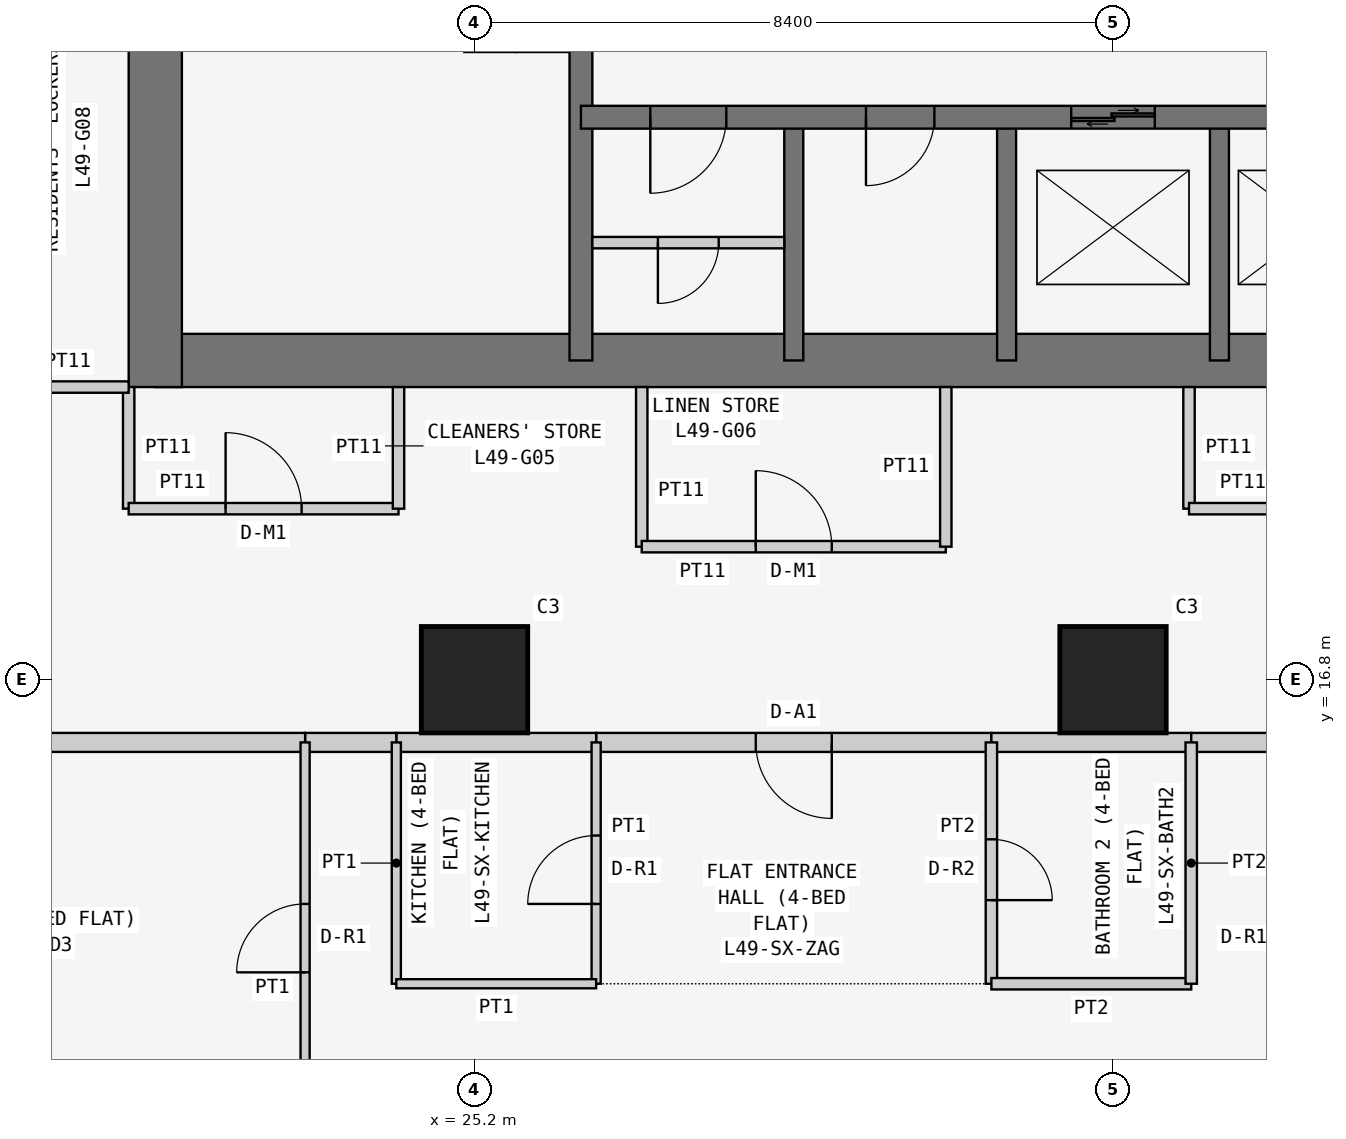
"""IFC4 building model, lengths in metres.
Left out: names, types, materials, properties, quantities, classifications, styles, units other than length and angle.
Written with IfcOpenShell. Run it as: python <this file> out.ifc"""

import sys

from ifc_helpers import new_model, si_unit, direction, frame, frame_2d, origin, origin_2d, place, context, subcontext, project, spatial, rectangle, extrude, element, fill, save


model = new_model("IFC4")
c1 = context("Model", 3, precision=1e-05, world=origin(), true_north=direction((0.0, 1.0)))
c2 = subcontext(c1, "Body", "Model", "MODEL_VIEW")
j1 = project(units=[si_unit("LENGTHUNIT", "METRE"), si_unit("PLANEANGLEUNIT", "RADIAN")], contexts=[c1])
p1 = place(None, origin())
s1 = spatial("IfcSite", under=j1, at=p1, CompositionType="ELEMENT")
p2 = place(p1, origin())
s2 = spatial("IfcBuilding", under=s1, at=p2, CompositionType="ELEMENT")
p3 = place(p2, frame((0.0, 0.0, 190.5)))
s3 = spatial("IfcBuildingStorey", under=s2, at=p3, CompositionType="ELEMENT", Elevation=190.5)
for number, where, z_axis, x_axis in (
    (1, (25.2, 16.8, 0.0), (0.0, 0.0, 1.0), (1.0, 0.0, 0.0)),
    (2, (33.6, 16.8, 0.0), (0.0, 0.0, 1.0), (1.0, 0.0, 0.0)),
):
    element("IfcColumn", number, at=place(p3, frame(where, z_axis=z_axis, x_axis=x_axis)), inside=s3, PredefinedType="COLUMN", context=c2, shape_type="SweptSolid", body=[
        extrude(rectangle(XDim=1.4, YDim=1.4, at=origin_2d()), origin(), (0.0, 0.0, 1.0), 3.6),
    ])
p4 = place(p3, frame((21.0, 21.0, 0.0), z_axis=(0.0, 0.0, 1.0), x_axis=(1.0, 0.0, 0.0)))
e3 = element("IfcWall", 3, at=p4, inside=s3, PredefinedType="SHEAR", context=c2, shape_type="SweptSolid", body=[
    extrude(rectangle(XDim=17.15, YDim=0.7, at=frame_2d((8.575, 0.0))), origin(), (0.0, 0.0, 1.0), 3.6),
])
p5 = place(p3, frame((21.0, 37.8, 0.0), z_axis=(0.0, 0.0, 1.0), x_axis=(0.0, -1.0, 0.0)))
e4 = element("IfcWall", 4, at=p5, inside=s3, PredefinedType="SHEAR", context=c2, shape_type="SweptSolid", body=[
    extrude(rectangle(XDim=17.15, YDim=0.7, at=frame_2d((8.575, 0.0))), origin(), (0.0, 0.0, 1.0), 3.6),
])
p6 = place(p5, frame((5.4, 0.0, 0.0)))
e5 = element("IfcOpeningElement", 5, at=p6, cuts=e4, PredefinedType="OPENING", context=c2, shape_type="SweptSolid", body=[
    extrude(rectangle(XDim=1.2, YDim=2.1, at=frame_2d((0.6, 1.05))), frame((0.0, 0.36, 0.0), z_axis=(0.0, -1.0, 0.0), x_axis=(1.0, 0.0, 0.0)), (0.0, 0.0, 1.0), 0.72),
])
p7 = place(p3, frame((26.6, 21.0, 0.0), z_axis=(0.0, 0.0, 1.0), x_axis=(0.0, 1.0, 0.0)))
e6 = element("IfcWall", 6, at=p7, inside=s3, PredefinedType="SHEAR", context=c2, shape_type="SweptSolid", body=[
    extrude(rectangle(XDim=16.8, YDim=0.3, at=frame_2d((8.4, 0.0))), origin(), (0.0, 0.0, 1.0), 3.6),
])
p8 = place(p7, frame((10.4, 0.0, 0.0)))
e7 = element("IfcOpeningElement", 7, at=p8, cuts=e6, PredefinedType="OPENING", context=c2, shape_type="SweptSolid", body=[
    extrude(rectangle(XDim=1.2, YDim=2.1, at=frame_2d((0.6, 1.05))), frame((0.0, 0.16, 0.0), z_axis=(0.0, -1.0, 0.0), x_axis=(1.0, 0.0, 0.0)), (0.0, 0.0, 1.0), 0.32),
])
p9 = place(p3, frame((26.6, 24.2, 0.0), z_axis=(0.0, 0.0, 1.0), x_axis=(1.0, 0.0, 0.0)))
e8 = element("IfcWall", 8, at=p9, inside=s3, PredefinedType="SHEAR", context=c2, shape_type="SweptSolid", body=[
    extrude(rectangle(XDim=11.2, YDim=0.3, at=frame_2d((5.6, 0.0))), origin(), (0.0, 0.0, 1.0), 3.6),
])
p10 = place(p9, frame((0.913, 0.0, 0.0)))
e9 = element("IfcOpeningElement", 9, at=p10, cuts=e8, PredefinedType="OPENING", context=c2, shape_type="SweptSolid", body=[
    extrude(rectangle(XDim=1.0, YDim=2.1, at=frame_2d((0.5, 1.05))), frame((0.0, 0.16, 0.0), z_axis=(0.0, -1.0, 0.0), x_axis=(1.0, 0.0, 0.0)), (0.0, 0.0, 1.0), 0.32),
])
p11 = place(p9, frame((3.75, 0.0, 0.0)))
e10 = element("IfcOpeningElement", 10, at=p11, cuts=e8, PredefinedType="OPENING", context=c2, shape_type="SweptSolid", body=[
    extrude(rectangle(XDim=0.9, YDim=2.1, at=frame_2d((0.45, 1.05))), frame((0.0, 0.16, 0.0), z_axis=(0.0, -1.0, 0.0), x_axis=(1.0, 0.0, 0.0)), (0.0, 0.0, 1.0), 0.32),
])
p12 = place(p9, frame((6.45, 0.0, 0.0)))
e11 = element("IfcOpeningElement", 11, at=p12, cuts=e8, PredefinedType="OPENING", context=c2, shape_type="SweptSolid", body=[
    extrude(rectangle(XDim=1.1, YDim=2.1, at=frame_2d((0.55, 1.05))), frame((0.0, 0.16, 0.0), z_axis=(0.0, -1.0, 0.0), x_axis=(1.0, 0.0, 0.0)), (0.0, 0.0, 1.0), 0.32),
])
p13 = place(p9, frame((9.1, 0.0, 0.0)))
e12 = element("IfcOpeningElement", 12, at=p13, cuts=e8, PredefinedType="OPENING", context=c2, shape_type="SweptSolid", body=[
    extrude(rectangle(XDim=1.1, YDim=2.1, at=frame_2d((0.55, 1.05))), frame((0.0, 0.16, 0.0), z_axis=(0.0, -1.0, 0.0), x_axis=(1.0, 0.0, 0.0)), (0.0, 0.0, 1.0), 0.32),
])
for number, where, z_axis, x_axis in (
    (13, (29.4, 21.0, 0.0), (0.0, 0.0, 1.0), (0.0, 1.0, 0.0)),
    (14, (32.2, 21.0, 0.0), (0.0, 0.0, 1.0), (0.0, 1.0, 0.0)),
    (15, (35.0, 21.0, 0.0), (0.0, 0.0, 1.0), (0.0, 1.0, 0.0)),
):
    element("IfcWall", number, at=place(p3, frame(where, z_axis=z_axis, x_axis=x_axis)), inside=s3, PredefinedType="SHEAR", context=c2, shape_type="SweptSolid", body=[
        extrude(rectangle(XDim=3.2, YDim=0.25, at=frame_2d((1.6, 0.0))), origin(), (0.0, 0.0, 1.0), 3.6),
    ])
p14 = place(p3, frame((20.65, 20.65, 0.0), z_axis=(0.0, 0.0, 1.0), x_axis=(0.0, -1.0, 0.0)))
e16 = element("IfcWall", 16, at=p14, inside=s3, PredefinedType="PARTITIONING", context=c2, shape_type="SweptSolid", body=[
    extrude(rectangle(XDim=1.6, YDim=0.15, at=frame_2d((0.8, 0.0))), origin(), (0.0, 0.0, 1.0), 3.45),
])
p15 = place(p3, frame((20.65, 19.05, 0.0), z_axis=(0.0, 0.0, 1.0), x_axis=(1.0, 0.0, 0.0)))
e17 = element("IfcWall", 17, at=p15, inside=s3, PredefinedType="PARTITIONING", context=c2, shape_type="SweptSolid", body=[
    extrude(rectangle(XDim=3.55, YDim=0.15, at=frame_2d((1.775, 0.0))), origin(), (0.0, 0.0, 1.0), 3.45),
])
p16 = place(p15, frame((1.275, 0.0, 0.0)))
e18 = element("IfcOpeningElement", 18, at=p16, cuts=e17, PredefinedType="OPENING", context=c2, shape_type="SweptSolid", body=[
    extrude(rectangle(XDim=1.0, YDim=2.1, at=frame_2d((0.5, 1.05))), frame((0.0, 0.085, 0.0), z_axis=(0.0, -1.0, 0.0), x_axis=(1.0, 0.0, 0.0)), (0.0, 0.0, 1.0), 0.17),
])
p17 = place(p3, frame((24.2, 19.05, 0.0), z_axis=(0.0, 0.0, 1.0), x_axis=(0.0, 1.0, 0.0)))
e19 = element("IfcWall", 19, at=p17, inside=s3, PredefinedType="PARTITIONING", context=c2, shape_type="SweptSolid", body=[
    extrude(rectangle(XDim=1.6, YDim=0.15, at=frame_2d((0.8, 0.0))), origin(), (0.0, 0.0, 1.0), 3.45),
])
p18 = place(p3, frame((27.4, 20.65, 0.0), z_axis=(0.0, 0.0, 1.0), x_axis=(0.0, -1.0, 0.0)))
e20 = element("IfcWall", 20, at=p18, inside=s3, PredefinedType="PARTITIONING", context=c2, shape_type="SweptSolid", body=[
    extrude(rectangle(XDim=2.1, YDim=0.15, at=frame_2d((1.05, 0.0))), origin(), (0.0, 0.0, 1.0), 3.45),
])
p19 = place(p3, frame((27.4, 18.55, 0.0), z_axis=(0.0, 0.0, 1.0), x_axis=(1.0, 0.0, 0.0)))
e21 = element("IfcWall", 21, at=p19, inside=s3, PredefinedType="PARTITIONING", context=c2, shape_type="SweptSolid", body=[
    extrude(rectangle(XDim=4.0, YDim=0.15, at=frame_2d((2.0, 0.0))), origin(), (0.0, 0.0, 1.0), 3.45),
])
p20 = place(p19, frame((1.5, 0.0, 0.0)))
e22 = element("IfcOpeningElement", 22, at=p20, cuts=e21, PredefinedType="OPENING", context=c2, shape_type="SweptSolid", body=[
    extrude(rectangle(XDim=1.0, YDim=2.1, at=frame_2d((0.5, 1.05))), frame((0.0, 0.085, 0.0), z_axis=(0.0, -1.0, 0.0), x_axis=(1.0, 0.0, 0.0)), (0.0, 0.0, 1.0), 0.17),
])
p21 = place(p3, frame((31.4, 18.55, 0.0), z_axis=(0.0, 0.0, 1.0), x_axis=(0.0, 1.0, 0.0)))
e23 = element("IfcWall", 23, at=p21, inside=s3, PredefinedType="PARTITIONING", context=c2, shape_type="SweptSolid", body=[
    extrude(rectangle(XDim=2.1, YDim=0.15, at=frame_2d((1.05, 0.0))), origin(), (0.0, 0.0, 1.0), 3.45),
])
p22 = place(p3, frame((34.6, 20.65, 0.0), z_axis=(0.0, 0.0, 1.0), x_axis=(0.0, -1.0, 0.0)))
e24 = element("IfcWall", 24, at=p22, inside=s3, PredefinedType="PARTITIONING", context=c2, shape_type="SweptSolid", body=[
    extrude(rectangle(XDim=1.6, YDim=0.15, at=frame_2d((0.8, 0.0))), origin(), (0.0, 0.0, 1.0), 3.45),
])
p23 = place(p3, frame((34.6, 19.05, 0.0), z_axis=(0.0, 0.0, 1.0), x_axis=(1.0, 0.0, 0.0)))
e25 = element("IfcWall", 25, at=p23, inside=s3, PredefinedType="PARTITIONING", context=c2, shape_type="SweptSolid", body=[
    extrude(rectangle(XDim=3.55, YDim=0.15, at=frame_2d((1.775, 0.0))), origin(), (0.0, 0.0, 1.0), 3.45),
])
p24 = place(p23, frame((1.275, 0.0, 0.0)))
e26 = element("IfcOpeningElement", 26, at=p24, cuts=e25, PredefinedType="OPENING", context=c2, shape_type="SweptSolid", body=[
    extrude(rectangle(XDim=1.0, YDim=2.1, at=frame_2d((0.5, 1.05))), frame((0.0, 0.085, 0.0), z_axis=(0.0, -1.0, 0.0), x_axis=(1.0, 0.0, 0.0)), (0.0, 0.0, 1.0), 0.17),
])
p25 = place(p3, frame((19.05, 20.65, 0.0), z_axis=(0.0, 0.0, 1.0), x_axis=(1.0, 0.0, 0.0)))
e27 = element("IfcWall", 27, at=p25, inside=s3, PredefinedType="PARTITIONING", context=c2, shape_type="SweptSolid", body=[
    extrude(rectangle(XDim=1.6, YDim=0.15, at=frame_2d((0.8, 0.0))), origin(), (0.0, 0.0, 1.0), 3.45),
])
p26 = place(p3, frame((32.0, 15.975, 0.0), z_axis=(0.0, 0.0, 1.0), x_axis=(-1.0, 0.0, 0.0)))
e28 = element("IfcWall", 28, at=p26, inside=s3, PredefinedType="PARTITIONING", context=c2, shape_type="SweptSolid", body=[
    extrude(rectangle(XDim=5.2, YDim=0.25, at=frame_2d((2.6, 0.0))), origin(), (0.0, 0.0, 1.0), 3.45),
])
p27 = place(p26, frame((2.1, 0.0, 0.0)))
e29 = element("IfcOpeningElement", 29, at=p27, cuts=e28, PredefinedType="OPENING", context=c2, shape_type="SweptSolid", body=[
    extrude(rectangle(XDim=1.0, YDim=2.1, at=frame_2d((0.5, 1.05))), frame((0.0, 0.135, 0.0), z_axis=(0.0, -1.0, 0.0), x_axis=(1.0, 0.0, 0.0)), (0.0, 0.0, 1.0), 0.27),
])
p28 = place(p3, frame((34.629, 15.975, 0.0), z_axis=(0.0, 0.0, 1.0), x_axis=(-1.0, 0.0, 0.0)))
e30 = element("IfcWall", 30, at=p28, inside=s3, PredefinedType="PARTITIONING", context=c2, shape_type="SweptSolid", body=[
    extrude(rectangle(XDim=2.629, YDim=0.25, at=frame_2d((1.314, 0.0))), origin(), (0.0, 0.0, 1.0), 3.45),
])
p29 = place(p3, frame((26.8, 15.975, 0.0), z_axis=(0.0, 0.0, 1.0), x_axis=(-1.0, 0.0, 0.0)))
e31 = element("IfcWall", 31, at=p29, inside=s3, PredefinedType="PARTITIONING", context=c2, shape_type="SweptSolid", body=[
    extrude(rectangle(XDim=2.629, YDim=0.25, at=frame_2d((1.314, 0.0))), origin(), (0.0, 0.0, 1.0), 3.45),
])
p30 = place(p3, frame((24.171, 15.975, 0.0), z_axis=(0.0, 0.0, 1.0), x_axis=(-1.0, 0.0, 0.0)))
e32 = element("IfcWall", 32, at=p30, inside=s3, PredefinedType="PARTITIONING", context=c2, shape_type="SweptSolid", body=[
    extrude(rectangle(XDim=1.2, YDim=0.25, at=frame_2d((0.6, 0.0))), origin(), (0.0, 0.0, 1.0), 3.45),
])
p31 = place(p3, frame((35.829, 15.975, 0.0), z_axis=(0.0, 0.0, 1.0), x_axis=(-1.0, 0.0, 0.0)))
e33 = element("IfcWall", 33, at=p31, inside=s3, PredefinedType="PARTITIONING", context=c2, shape_type="SweptSolid", body=[
    extrude(rectangle(XDim=1.2, YDim=0.25, at=frame_2d((0.6, 0.0))), origin(), (0.0, 0.0, 1.0), 3.45),
])
p32 = place(p3, frame((22.971, 15.975, 0.0), z_axis=(0.0, 0.0, 1.0), x_axis=(-1.0, 0.0, 0.0)))
e34 = element("IfcWall", 34, at=p32, inside=s3, PredefinedType="PARTITIONING", context=c2, shape_type="SweptSolid", body=[
    extrude(rectangle(XDim=6.871, YDim=0.25, at=frame_2d((3.436, 0.0))), origin(), (0.0, 0.0, 1.0), 3.45),
])
p33 = place(p3, frame((32.0, 12.8, 0.0), z_axis=(0.0, 0.0, 1.0), x_axis=(0.0, 1.0, 0.0)))
e35 = element("IfcWall", 35, at=p33, inside=s3, PredefinedType="PARTITIONING", context=c2, shape_type="SweptSolid", body=[
    extrude(rectangle(XDim=3.175, YDim=0.15, at=frame_2d((1.587, 0.0))), origin(), (0.0, 0.0, 1.0), 3.45),
])
p34 = place(p33, frame((1.1, 0.0, 0.0)))
e36 = element("IfcOpeningElement", 36, at=p34, cuts=e35, PredefinedType="OPENING", context=c2, shape_type="SweptSolid", body=[
    extrude(rectangle(XDim=0.8, YDim=2.1, at=frame_2d((0.4, 1.05))), frame((0.0, 0.085, 0.0), z_axis=(0.0, -1.0, 0.0), x_axis=(1.0, 0.0, 0.0)), (0.0, 0.0, 1.0), 0.17),
])
p35 = place(p3, frame((26.8, 15.975, 0.0), z_axis=(0.0, 0.0, 1.0), x_axis=(0.0, -1.0, 0.0)))
e37 = element("IfcWall", 37, at=p35, inside=s3, PredefinedType="PARTITIONING", context=c2, shape_type="SweptSolid", body=[
    extrude(rectangle(XDim=3.175, YDim=0.12, at=frame_2d((1.587, 0.0))), origin(), (0.0, 0.0, 1.0), 3.45),
])
p36 = place(p35, frame((1.225, 0.0, 0.0)))
e38 = element("IfcOpeningElement", 38, at=p36, cuts=e37, PredefinedType="OPENING", context=c2, shape_type="SweptSolid", body=[
    extrude(rectangle(XDim=0.9, YDim=2.1, at=frame_2d((0.45, 1.05))), frame((0.0, 0.07, 0.0), z_axis=(0.0, -1.0, 0.0), x_axis=(1.0, 0.0, 0.0)), (0.0, 0.0, 1.0), 0.14),
])
p37 = place(p3, frame((32.0, 12.8, 0.0), z_axis=(0.0, 0.0, 1.0), x_axis=(1.0, 0.0, 0.0)))
e39 = element("IfcWall", 39, at=p37, inside=s3, PredefinedType="PARTITIONING", context=c2, shape_type="SweptSolid", body=[
    extrude(rectangle(XDim=2.629, YDim=0.15, at=frame_2d((1.314, 0.0))), origin(), (0.0, 0.0, 1.0), 3.45),
])
p38 = place(p3, frame((34.629, 12.8, 0.0), z_axis=(0.0, 0.0, 1.0), x_axis=(0.0, 1.0, 0.0)))
e40 = element("IfcWall", 40, at=p38, inside=s3, PredefinedType="PARTITIONING", context=c2, shape_type="SweptSolid", body=[
    extrude(rectangle(XDim=3.175, YDim=0.15, at=frame_2d((1.587, 0.0))), origin(), (0.0, 0.0, 1.0), 3.45),
])
p39 = place(p3, frame((24.171, 15.975, 0.0), z_axis=(0.0, 0.0, 1.0), x_axis=(0.0, -1.0, 0.0)))
e41 = element("IfcWall", 41, at=p39, inside=s3, PredefinedType="PARTITIONING", context=c2, shape_type="SweptSolid", body=[
    extrude(rectangle(XDim=3.175, YDim=0.12, at=frame_2d((1.587, 0.0))), origin(), (0.0, 0.0, 1.0), 3.45),
])
p40 = place(p3, frame((24.171, 12.8, 0.0), z_axis=(0.0, 0.0, 1.0), x_axis=(1.0, 0.0, 0.0)))
e42 = element("IfcWall", 42, at=p40, inside=s3, PredefinedType="PARTITIONING", context=c2, shape_type="SweptSolid", body=[
    extrude(rectangle(XDim=2.629, YDim=0.12, at=frame_2d((1.314, 0.0))), origin(), (0.0, 0.0, 1.0), 3.45),
])
p41 = place(p3, frame((22.971, 11.0, 0.0), z_axis=(0.0, 0.0, 1.0), x_axis=(0.0, 1.0, 0.0)))
e43 = element("IfcWall", 43, at=p41, inside=s3, PredefinedType="PARTITIONING", context=c2, shape_type="SweptSolid", body=[
    extrude(rectangle(XDim=4.975, YDim=0.12, at=frame_2d((2.488, 0.0))), origin(), (0.0, 0.0, 1.0), 3.45),
])
p42 = place(p41, frame((1.95, 0.0, 0.0)))
e44 = element("IfcOpeningElement", 44, at=p42, cuts=e43, PredefinedType="OPENING", context=c2, shape_type="SweptSolid", body=[
    extrude(rectangle(XDim=0.9, YDim=2.1, at=frame_2d((0.45, 1.05))), frame((0.0, 0.07, 0.0), z_axis=(0.0, -1.0, 0.0), x_axis=(1.0, 0.0, 0.0)), (0.0, 0.0, 1.0), 0.14),
])
p43 = place(p3, frame((26.75, 22.55, 0.0), z_axis=(0.0, 0.0, 1.0), x_axis=(1.0, 0.0, 0.0)))
e45 = element("IfcWall", 45, at=p43, inside=s3, PredefinedType="PARTITIONING", context=c2, shape_type="SweptSolid", body=[
    extrude(rectangle(XDim=2.525, YDim=0.15, at=frame_2d((1.262, 0.0))), origin(), (0.0, 0.0, 1.0), 3.45),
])
p44 = place(p43, frame((0.863, 0.0, 0.0)))
e46 = element("IfcOpeningElement", 46, at=p44, cuts=e45, PredefinedType="OPENING", context=c2, shape_type="SweptSolid", body=[
    extrude(rectangle(XDim=0.8, YDim=2.1, at=frame_2d((0.4, 1.05))), frame((0.0, 0.085, 0.0), z_axis=(0.0, -1.0, 0.0), x_axis=(1.0, 0.0, 0.0)), (0.0, 0.0, 1.0), 0.17),
])
p45 = place(p16, origin())
e47 = element("IfcDoor", 47, at=p45, inside=s3, OperationType="SINGLE_SWING_LEFT", PredefinedType="DOOR", context=c2, shape_type="SweptSolid", body=[
    extrude(rectangle(XDim=1.0, YDim=2.1, at=frame_2d((0.5, 1.05))), frame((0.0, 0.025, 0.0), z_axis=(0.0, -1.0, 0.0), x_axis=(1.0, 0.0, 0.0)), (0.0, 0.0, 1.0), 0.05),
])
fill(e18, e47)
p46 = place(p20, origin())
e48 = element("IfcDoor", 48, at=p46, inside=s3, OperationType="SINGLE_SWING_LEFT", PredefinedType="DOOR", context=c2, shape_type="SweptSolid", body=[
    extrude(rectangle(XDim=1.0, YDim=2.1, at=frame_2d((0.5, 1.05))), frame((0.0, 0.025, 0.0), z_axis=(0.0, -1.0, 0.0), x_axis=(1.0, 0.0, 0.0)), (0.0, 0.0, 1.0), 0.05),
])
fill(e22, e48)
p47 = place(p27, origin())
e49 = element("IfcDoor", 49, at=p47, inside=s3, OperationType="SINGLE_SWING_LEFT", PredefinedType="DOOR", context=c2, shape_type="SweptSolid", body=[
    extrude(rectangle(XDim=1.0, YDim=2.1, at=frame_2d((0.5, 1.05))), frame((0.0, 0.025, 0.0), z_axis=(0.0, -1.0, 0.0), x_axis=(1.0, 0.0, 0.0)), (0.0, 0.0, 1.0), 0.05),
])
fill(e29, e49)
p48 = place(p34, frame((0.8, 0.0, 0.0), z_axis=(0.0, 0.0, 1.0), x_axis=(-1.0, 0.0, 0.0)))
e50 = element("IfcDoor", 50, at=p48, inside=s3, OperationType="SINGLE_SWING_RIGHT", PredefinedType="DOOR", context=c2, shape_type="SweptSolid", body=[
    extrude(rectangle(XDim=0.8, YDim=2.1, at=frame_2d((0.4, 1.05))), frame((0.0, 0.025, 0.0), z_axis=(0.0, -1.0, 0.0), x_axis=(1.0, 0.0, 0.0)), (0.0, 0.0, 1.0), 0.05),
])
fill(e36, e50)
p49 = place(p36, frame((0.9, 0.0, 0.0), z_axis=(0.0, 0.0, 1.0), x_axis=(-1.0, 0.0, 0.0)))
e51 = element("IfcDoor", 51, at=p49, inside=s3, OperationType="SINGLE_SWING_LEFT", PredefinedType="DOOR", context=c2, shape_type="SweptSolid", body=[
    extrude(rectangle(XDim=0.9, YDim=2.1, at=frame_2d((0.45, 1.05))), frame((0.0, 0.025, 0.0), z_axis=(0.0, -1.0, 0.0), x_axis=(1.0, 0.0, 0.0)), (0.0, 0.0, 1.0), 0.05),
])
fill(e38, e51)
p50 = place(p42, origin())
e52 = element("IfcDoor", 52, at=p50, inside=s3, OperationType="SINGLE_SWING_LEFT", PredefinedType="DOOR", context=c2, shape_type="SweptSolid", body=[
    extrude(rectangle(XDim=0.9, YDim=2.1, at=frame_2d((0.45, 1.05))), frame((0.0, 0.025, 0.0), z_axis=(0.0, -1.0, 0.0), x_axis=(1.0, 0.0, 0.0)), (0.0, 0.0, 1.0), 0.05),
])
fill(e44, e52)
p51 = place(p10, frame((1.0, 0.0, 0.0), z_axis=(0.0, 0.0, 1.0), x_axis=(-1.0, 0.0, 0.0)))
e53 = element("IfcDoor", 53, at=p51, inside=s3, OperationType="SINGLE_SWING_RIGHT", PredefinedType="DOOR", context=c2, shape_type="SweptSolid", body=[
    extrude(rectangle(XDim=1.0, YDim=2.1, at=frame_2d((0.5, 1.05))), frame((0.0, 0.025, 0.0), z_axis=(0.0, -1.0, 0.0), x_axis=(1.0, 0.0, 0.0)), (0.0, 0.0, 1.0), 0.05),
])
fill(e9, e53)
p52 = place(p44, frame((0.8, 0.0, 0.0), z_axis=(0.0, 0.0, 1.0), x_axis=(-1.0, 0.0, 0.0)))
e54 = element("IfcDoor", 54, at=p52, inside=s3, OperationType="SINGLE_SWING_RIGHT", PredefinedType="DOOR", context=c2, shape_type="SweptSolid", body=[
    extrude(rectangle(XDim=0.8, YDim=2.1, at=frame_2d((0.4, 1.05))), frame((0.0, 0.025, 0.0), z_axis=(0.0, -1.0, 0.0), x_axis=(1.0, 0.0, 0.0)), (0.0, 0.0, 1.0), 0.05),
])
fill(e46, e54)
p53 = place(p11, frame((0.9, 0.0, 0.0), z_axis=(0.0, 0.0, 1.0), x_axis=(-1.0, 0.0, 0.0)))
e55 = element("IfcDoor", 55, at=p53, inside=s3, OperationType="SINGLE_SWING_RIGHT", PredefinedType="DOOR", context=c2, shape_type="SweptSolid", body=[
    extrude(rectangle(XDim=0.9, YDim=2.1, at=frame_2d((0.45, 1.05))), frame((0.0, 0.025, 0.0), z_axis=(0.0, -1.0, 0.0), x_axis=(1.0, 0.0, 0.0)), (0.0, 0.0, 1.0), 0.05),
])
fill(e10, e55)
p54 = place(p12, origin())
e56 = element("IfcDoor", 56, at=p54, inside=s3, OperationType="DOUBLE_DOOR_SLIDING", PredefinedType="DOOR", context=c2, shape_type="SweptSolid", body=[
    extrude(rectangle(XDim=1.1, YDim=2.1, at=frame_2d((0.55, 1.05))), frame((0.0, 0.025, 0.0), z_axis=(0.0, -1.0, 0.0), x_axis=(1.0, 0.0, 0.0)), (0.0, 0.0, 1.0), 0.05),
])
fill(e11, e56)
save(model, sys.argv[1])
